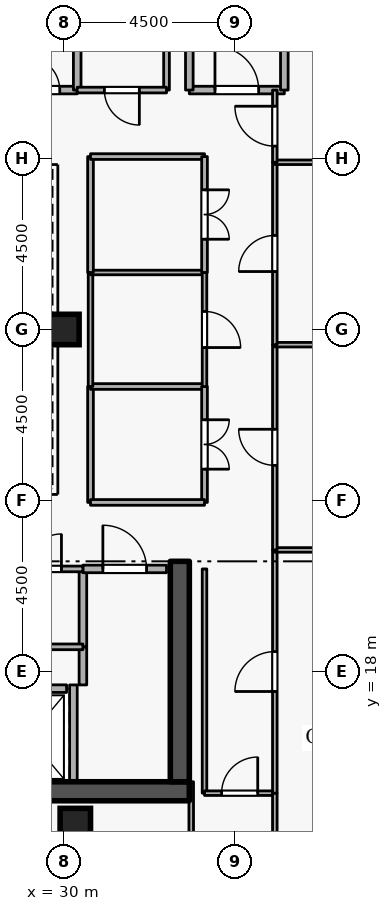
"""IFC4 building model, lengths in metres.
Left out: names, types, materials, properties, quantities, classifications, styles, units other than length and angle.
Written with IfcOpenShell. Run it as: python <this file> out.ifc"""

import sys

from ifc_helpers import new_model, si_unit, direction, frame, frame_2d, origin, origin_2d, place, context, subcontext, project, spatial, rectangle, extrude, element, fill, save


model = new_model("IFC4")
c1 = context("Model", 3, precision=1e-05, world=origin(), true_north=direction((0.0, 1.0)))
c2 = subcontext(c1, "Body", "Model", "MODEL_VIEW")
j1 = project(units=[si_unit("LENGTHUNIT", "METRE"), si_unit("PLANEANGLEUNIT", "RADIAN")], contexts=[c1])
p1 = place(None, origin())
s1 = spatial("IfcSite", under=j1, at=p1, CompositionType="ELEMENT")
p2 = place(p1, origin())
s2 = spatial("IfcBuilding", under=s1, at=p2, CompositionType="ELEMENT")
p3 = place(p2, frame((0.0, 0.0, 276.3)))
s3 = spatial("IfcBuildingStorey", under=s2, at=p3, CompositionType="ELEMENT", Elevation=276.3)
p4 = place(p3, frame((17.7, 14.85, 0.0), z_axis=(0.0, 0.0, 1.0), x_axis=(1.0, 0.0, 0.0)))
e1 = element("IfcWall", 1, at=p4, inside=s3, PredefinedType="SHEAR", context=c2, shape_type="SweptSolid", body=[
    extrude(rectangle(XDim=15.6, YDim=0.5, at=frame_2d((7.8, 0.0))), origin(), (0.0, 0.0, 1.0), 3.6),
])
p5 = place(p3, frame((33.05, 15.1, 0.0), z_axis=(0.0, 0.0, 1.0), x_axis=(0.0, 1.0, 0.0)))
e2 = element("IfcWall", 2, at=p5, inside=s3, PredefinedType="SHEAR", context=c2, shape_type="SweptSolid", body=[
    extrude(rectangle(XDim=5.8, YDim=0.5, at=frame_2d((2.9, 0.0))), origin(), (0.0, 0.0, 1.0), 3.6),
])
for number, where, z_axis, x_axis in (
    (3, (30.3, 14.0, 0.0), (0.0, 0.0, 1.0), (1.0, 0.0, 0.0)),
    (4, (30.0, 27.0, 0.0), (0.0, 0.0, 1.0), (1.0, 0.0, 0.0)),
):
    element("IfcColumn", number, at=place(p3, frame(where, z_axis=z_axis, x_axis=x_axis)), inside=s3, PredefinedType="COLUMN", context=c2, shape_type="SweptSolid", body=[
        extrude(rectangle(XDim=0.8, YDim=0.8, at=origin_2d()), origin(), (0.0, 0.0, 1.0), 3.6),
    ])
p6 = place(p3, frame((28.08, 17.55, 0.0), z_axis=(0.0, 0.0, 1.0), x_axis=(1.0, 0.0, 0.0)))
e5 = element("IfcWall", 5, at=p6, inside=s3, PredefinedType="STANDARD", context=c2, shape_type="SweptSolid", body=[
    extrude(rectangle(XDim=1.99, YDim=0.2, at=frame_2d((0.995, 0.0))), origin(), (0.0, 0.0, 1.0), 3.26),
])
p7 = place(p6, frame((0.485, 0.0, 0.0)))
e6 = element("IfcOpeningElement", 6, at=p7, cuts=e5, PredefinedType="OPENING", context=c2, shape_type="SweptSolid", body=[
    extrude(rectangle(XDim=1.02, YDim=2.06, at=frame_2d((0.51, 1.03))), frame((0.0, 0.11, 0.0), z_axis=(0.0, -1.0, 0.0), x_axis=(1.0, 0.0, 0.0)), (0.0, 0.0, 1.0), 0.22),
])
p8 = place(p3, frame((30.25, 15.112, 0.0), z_axis=(0.0, 0.0, 1.0), x_axis=(0.0, 1.0, 0.0)))
e7 = element("IfcWall", 7, at=p8, inside=s3, PredefinedType="STANDARD", context=c2, shape_type="SweptSolid", body=[
    extrude(rectangle(XDim=2.536, YDim=0.2, at=frame_2d((1.268, 0.0))), origin(), (0.0, 0.0, 1.0), 3.26),
])
p9 = place(p3, frame((33.3, 33.3, 0.0), z_axis=(0.0, 0.0, 1.0), x_axis=(1.0, 0.0, 0.0)))
e8 = element("IfcWall", 8, at=p9, inside=s3, PredefinedType="STANDARD", context=c2, shape_type="SweptSolid", body=[
    extrude(rectangle(XDim=2.5, YDim=0.2, at=frame_2d((1.25, 0.0))), origin(), (0.0, 0.0, 1.0), 3.26),
])
p10 = place(p9, frame((0.675, 0.0, 0.0)))
e9 = element("IfcOpeningElement", 9, at=p10, cuts=e8, PredefinedType="OPENING", context=c2, shape_type="SweptSolid", body=[
    extrude(rectangle(XDim=1.15, YDim=2.1, at=frame_2d((0.575, 1.05))), frame((0.0, 0.11, 0.0), z_axis=(0.0, -1.0, 0.0), x_axis=(1.0, 0.0, 0.0)), (0.0, 0.0, 1.0), 0.22),
])
p11 = place(p3, frame((35.8, 33.3, 0.0), z_axis=(0.0, 0.0, 1.0), x_axis=(0.0, 1.0, 0.0)))
e10 = element("IfcWall", 10, at=p11, inside=s3, PredefinedType="STANDARD", context=c2, shape_type="SweptSolid", body=[
    extrude(rectangle(XDim=5.7, YDim=0.2, at=frame_2d((2.85, 0.0))), origin(), (0.0, 0.0, 1.0), 3.26),
])
p12 = place(p3, frame((33.3, 35.6, 0.0), z_axis=(0.0, 0.0, 1.0), x_axis=(0.0, -1.0, 0.0)))
e11 = element("IfcWall", 11, at=p12, inside=s3, PredefinedType="STANDARD", context=c2, shape_type="SweptSolid", body=[
    extrude(rectangle(XDim=2.3, YDim=0.2, at=frame_2d((1.15, 0.0))), origin(), (0.0, 0.0, 1.0), 2.465),
])
p13 = place(p3, frame((28.55, 33.3, 0.0), z_axis=(0.0, 0.0, 1.0), x_axis=(1.0, 0.0, 0.0)))
e12 = element("IfcWall", 12, at=p13, inside=s3, PredefinedType="STANDARD", context=c2, shape_type="SweptSolid", body=[
    extrude(rectangle(XDim=1.8, YDim=0.2, at=frame_2d((0.9, 0.0))), origin(), (0.0, 0.0, 1.0), 3.26),
])
p14 = place(p13, frame((0.46, 0.0, 0.0)))
e13 = element("IfcOpeningElement", 13, at=p14, cuts=e12, PredefinedType="OPENING", context=c2, shape_type="SweptSolid", body=[
    extrude(rectangle(XDim=0.88, YDim=2.04, at=frame_2d((0.44, 1.02))), frame((0.0, 0.11, 0.0), z_axis=(0.0, -1.0, 0.0), x_axis=(1.0, 0.0, 0.0)), (0.0, 0.0, 1.0), 0.22),
])
p15 = place(p3, frame((30.35, 33.3, 0.0), z_axis=(0.0, 0.0, 1.0), x_axis=(0.0, 1.0, 0.0)))
e14 = element("IfcWall", 14, at=p15, inside=s3, PredefinedType="STANDARD", context=c2, shape_type="SweptSolid", body=[
    extrude(rectangle(XDim=2.05, YDim=0.2, at=frame_2d((1.025, 0.0))), origin(), (0.0, 0.0, 1.0), 3.26),
])
p16 = place(p3, frame((30.5, 17.648, 0.0), z_axis=(0.0, 0.0, 1.0), x_axis=(0.0, 1.0, 0.0)))
e15 = element("IfcWall", 15, at=p16, inside=s3, PredefinedType="STANDARD", context=c2, shape_type="SweptSolid", body=[
    extrude(rectangle(XDim=1.002, YDim=0.2, at=frame_2d((0.501, 0.0))), origin(), (0.0, 0.0, 1.0), 3.26),
])
p17 = place(p3, frame((30.5, 18.65, 0.0), z_axis=(0.0, 0.0, 1.0), x_axis=(0.0, 1.0, 0.0)))
e16 = element("IfcWall", 16, at=p17, inside=s3, PredefinedType="STANDARD", context=c2, shape_type="SweptSolid", body=[
    extrude(rectangle(XDim=2.05, YDim=0.2, at=frame_2d((1.025, 0.0))), origin(), (0.0, 0.0, 1.0), 3.26),
])
p18 = place(p3, frame((30.5, 20.7, 0.0), z_axis=(0.0, 0.0, 1.0), x_axis=(1.0, 0.0, 0.0)))
e17 = element("IfcWall", 17, at=p18, inside=s3, PredefinedType="STANDARD", context=c2, shape_type="SweptSolid", body=[
    extrude(rectangle(XDim=2.2, YDim=0.2, at=frame_2d((1.1, 0.0))), origin(), (0.0, 0.0, 1.0), 3.26),
])
p19 = place(p18, frame((0.525, 0.0, 0.0)))
e18 = element("IfcOpeningElement", 18, at=p19, cuts=e17, PredefinedType="OPENING", context=c2, shape_type="SweptSolid", body=[
    extrude(rectangle(XDim=1.15, YDim=2.1, at=frame_2d((0.575, 1.05))), frame((0.0, 0.11, 0.0), z_axis=(0.0, -1.0, 0.0), x_axis=(1.0, 0.0, 0.0)), (0.0, 0.0, 1.0), 0.22),
])
p20 = place(p3, frame((30.5, 18.65, 0.0), z_axis=(0.0, 0.0, 1.0), x_axis=(-1.0, 0.0, 0.0)))
e19 = element("IfcWall", 19, at=p20, inside=s3, PredefinedType="PARTITIONING", context=c2, shape_type="SweptSolid", body=[
    extrude(rectangle(XDim=2.05, YDim=0.15, at=frame_2d((1.025, 0.0))), origin(), (0.0, 0.0, 1.0), 3.26),
])
p21 = place(p3, frame((28.45, 20.7, 0.0), z_axis=(0.0, 0.0, 1.0), x_axis=(1.0, 0.0, 0.0)))
e20 = element("IfcWall", 20, at=p21, inside=s3, PredefinedType="PARTITIONING", context=c2, shape_type="SweptSolid", body=[
    extrude(rectangle(XDim=2.05, YDim=0.15, at=frame_2d((1.025, 0.0))), origin(), (0.0, 0.0, 1.0), 3.26),
])
p22 = place(p21, frame((0.565, 0.0, 0.0)))
e21 = element("IfcOpeningElement", 21, at=p22, cuts=e20, PredefinedType="OPENING", context=c2, shape_type="SweptSolid", body=[
    extrude(rectangle(XDim=0.92, YDim=2.08, at=frame_2d((0.46, 1.04))), frame((0.0, 0.085, 0.0), z_axis=(0.0, -1.0, 0.0), x_axis=(1.0, 0.0, 0.0)), (0.0, 0.0, 1.0), 0.17),
])
p23 = place(p3, frame((32.7, 35.35, 0.0), z_axis=(0.0, 0.0, 1.0), x_axis=(0.0, -1.0, 0.0)))
e22 = element("IfcWall", 22, at=p23, inside=s3, PredefinedType="PARTITIONING", context=c2, shape_type="SweptSolid", body=[
    extrude(rectangle(XDim=2.05, YDim=0.15, at=frame_2d((1.025, 0.0))), origin(), (0.0, 0.0, 1.0), 2.465),
])
p24 = place(p3, frame((32.7, 33.3, 0.0), z_axis=(0.0, 0.0, 1.0), x_axis=(-1.0, 0.0, 0.0)))
e23 = element("IfcWall", 23, at=p24, inside=s3, PredefinedType="PARTITIONING", context=c2, shape_type="SweptSolid", body=[
    extrude(rectangle(XDim=2.35, YDim=0.15, at=frame_2d((1.175, 0.0))), origin(), (0.0, 0.0, 1.0), 3.26),
])
p25 = place(p24, frame((0.715, 0.0, 0.0)))
e24 = element("IfcOpeningElement", 24, at=p25, cuts=e23, PredefinedType="OPENING", context=c2, shape_type="SweptSolid", body=[
    extrude(rectangle(XDim=0.92, YDim=2.08, at=frame_2d((0.46, 1.04))), frame((0.0, 0.085, 0.0), z_axis=(0.0, -1.0, 0.0), x_axis=(1.0, 0.0, 0.0)), (0.0, 0.0, 1.0), 0.17),
])
p26 = place(p3, frame((33.7, 20.7, 0.0), z_axis=(0.0, 0.0, 1.0), x_axis=(0.0, -1.0, 0.0)))
e25 = element("IfcWall", 25, at=p26, inside=s3, PredefinedType="PARTITIONING", context=c2, shape_type="SweptSolid", body=[
    extrude(rectangle(XDim=5.9, YDim=0.12, at=frame_2d((2.95, 0.0))), origin(), (0.0, 0.0, 1.0), 3.26),
])
p27 = place(p3, frame((33.7, 14.8, 0.0), z_axis=(0.0, 0.0, 1.0), x_axis=(1.0, 0.0, 0.0)))
e26 = element("IfcWall", 26, at=p27, inside=s3, PredefinedType="PARTITIONING", context=c2, shape_type="SweptSolid", body=[
    extrude(rectangle(XDim=1.85, YDim=0.12, at=frame_2d((0.925, 0.0))), origin(), (0.0, 0.0, 1.0), 3.26),
])
p28 = place(p27, frame((0.45, 0.0, 0.0)))
e27 = element("IfcOpeningElement", 27, at=p28, cuts=e26, PredefinedType="OPENING", context=c2, shape_type="SweptSolid", body=[
    extrude(rectangle(XDim=0.95, YDim=2.1, at=frame_2d((0.475, 1.05))), frame((0.0, 0.07, 0.0), z_axis=(0.0, -1.0, 0.0), x_axis=(1.0, 0.0, 0.0)), (0.0, 0.0, 1.0), 0.14),
])
p29 = place(p3, frame((35.55, 14.8, 0.0), z_axis=(0.0, 0.0, 1.0), x_axis=(0.0, -1.0, 0.0)))
e28 = element("IfcWall", 28, at=p29, inside=s3, PredefinedType="PARTITIONING", context=c2, shape_type="SweptSolid", body=[
    extrude(rectangle(XDim=11.52, YDim=0.12, at=frame_2d((5.76, 0.0))), origin(), (0.0, 0.0, 1.0), 3.26),
])
p30 = place(p3, frame((33.35, 3.28, 0.0), z_axis=(0.0, 0.0, 1.0), x_axis=(0.0, 1.0, 0.0)))
e29 = element("IfcWall", 29, at=p30, inside=s3, PredefinedType="PARTITIONING", context=c2, shape_type="SweptSolid", body=[
    extrude(rectangle(XDim=11.82, YDim=0.12, at=frame_2d((5.91, 0.0))), origin(), (0.0, 0.0, 1.0), 2.465),
])
p31 = place(p3, frame((35.55, 14.8, 0.0), z_axis=(0.0, 0.0, 1.0), x_axis=(0.0, 1.0, 0.0)))
e30 = element("IfcWall", 30, at=p31, inside=s3, PredefinedType="PARTITIONING", context=c2, shape_type="SweptSolid", body=[
    extrude(rectangle(XDim=6.4, YDim=0.12, at=frame_2d((3.2, 0.0))), origin(), (0.0, 0.0, 1.0), 3.26),
])
p32 = place(p31, frame((2.675, 0.0, 0.0)))
e31 = element("IfcOpeningElement", 31, at=p32, cuts=e30, PredefinedType="OPENING", context=c2, shape_type="SweptSolid", body=[
    extrude(rectangle(XDim=1.05, YDim=2.1, at=frame_2d((0.525, 1.05))), frame((0.0, 0.07, 0.0), z_axis=(0.0, -1.0, 0.0), x_axis=(1.0, 0.0, 0.0)), (0.0, 0.0, 1.0), 0.14),
])
p33 = place(p3, frame((35.55, 21.2, 0.0), z_axis=(0.0, 0.0, 1.0), x_axis=(1.0, 0.0, 0.0)))
e32 = element("IfcWall", 32, at=p33, inside=s3, PredefinedType="PARTITIONING", context=c2, shape_type="SweptSolid", body=[
    extrude(rectangle(XDim=13.67, YDim=0.12, at=frame_2d((6.835, 0.0))), origin(), (0.0, 0.0, 1.0), 3.26),
])
p34 = place(p3, frame((35.55, 21.2, 0.0), z_axis=(0.0, 0.0, 1.0), x_axis=(0.0, 1.0, 0.0)))
e33 = element("IfcWall", 33, at=p34, inside=s3, PredefinedType="PARTITIONING", context=c2, shape_type="SweptSolid", body=[
    extrude(rectangle(XDim=5.4, YDim=0.12, at=frame_2d((2.7, 0.0))), origin(), (0.0, 0.0, 1.0), 3.26),
])
p35 = place(p34, frame((2.225, 0.0, 0.0)))
e34 = element("IfcOpeningElement", 34, at=p35, cuts=e33, PredefinedType="OPENING", context=c2, shape_type="SweptSolid", body=[
    extrude(rectangle(XDim=0.95, YDim=2.1, at=frame_2d((0.475, 1.05))), frame((0.0, 0.07, 0.0), z_axis=(0.0, -1.0, 0.0), x_axis=(1.0, 0.0, 0.0)), (0.0, 0.0, 1.0), 0.14),
])
p36 = place(p3, frame((35.55, 26.6, 0.0), z_axis=(0.0, 0.0, 1.0), x_axis=(1.0, 0.0, 0.0)))
e35 = element("IfcWall", 35, at=p36, inside=s3, PredefinedType="PARTITIONING", context=c2, shape_type="SweptSolid", body=[
    extrude(rectangle(XDim=13.67, YDim=0.12, at=frame_2d((6.835, 0.0))), origin(), (0.0, 0.0, 1.0), 3.26),
])
p37 = place(p3, frame((35.55, 26.6, 0.0), z_axis=(0.0, 0.0, 1.0), x_axis=(0.0, 1.0, 0.0)))
e36 = element("IfcWall", 36, at=p37, inside=s3, PredefinedType="PARTITIONING", context=c2, shape_type="SweptSolid", body=[
    extrude(rectangle(XDim=4.8, YDim=0.12, at=frame_2d((2.4, 0.0))), origin(), (0.0, 0.0, 1.0), 3.26),
])
p38 = place(p37, frame((1.925, 0.0, 0.0)))
e37 = element("IfcOpeningElement", 37, at=p38, cuts=e36, PredefinedType="OPENING", context=c2, shape_type="SweptSolid", body=[
    extrude(rectangle(XDim=0.95, YDim=2.1, at=frame_2d((0.475, 1.05))), frame((0.0, 0.07, 0.0), z_axis=(0.0, -1.0, 0.0), x_axis=(1.0, 0.0, 0.0)), (0.0, 0.0, 1.0), 0.14),
])
p39 = place(p3, frame((35.55, 31.4, 0.0), z_axis=(0.0, 0.0, 1.0), x_axis=(1.0, 0.0, 0.0)))
e38 = element("IfcWall", 38, at=p39, inside=s3, PredefinedType="PARTITIONING", context=c2, shape_type="SweptSolid", body=[
    extrude(rectangle(XDim=13.67, YDim=0.12, at=frame_2d((6.835, 0.0))), origin(), (0.0, 0.0, 1.0), 3.26),
])
p40 = place(p3, frame((35.55, 31.4, 0.0), z_axis=(0.0, 0.0, 1.0), x_axis=(0.0, 1.0, 0.0)))
e39 = element("IfcWall", 39, at=p40, inside=s3, PredefinedType="PARTITIONING", context=c2, shape_type="SweptSolid", body=[
    extrude(rectangle(XDim=1.9, YDim=0.12, at=frame_2d((0.95, 0.0))), origin(), (0.0, 0.0, 1.0), 3.26),
])
p41 = place(p40, frame((0.425, 0.0, 0.0)))
e40 = element("IfcOpeningElement", 40, at=p41, cuts=e39, PredefinedType="OPENING", context=c2, shape_type="SweptSolid", body=[
    extrude(rectangle(XDim=1.05, YDim=2.1, at=frame_2d((0.525, 1.05))), frame((0.0, 0.07, 0.0), z_axis=(0.0, -1.0, 0.0), x_axis=(1.0, 0.0, 0.0)), (0.0, 0.0, 1.0), 0.14),
])
p42 = place(p3, frame((30.7, 22.45, 0.0), z_axis=(0.0, 0.0, 1.0), x_axis=(0.0, 1.0, 0.0)))
e41 = element("IfcWall", 41, at=p42, inside=s3, PredefinedType="PARTITIONING", context=c2, shape_type="SweptSolid", body=[
    extrude(rectangle(XDim=3.05, YDim=0.15, at=frame_2d((1.525, 0.0))), origin(), (0.0, 0.0, 1.0), 3.26),
])
p43 = place(p3, frame((30.7, 25.5, 0.0), z_axis=(0.0, 0.0, 1.0), x_axis=(1.0, 0.0, 0.0)))
e42 = element("IfcWall", 42, at=p43, inside=s3, PredefinedType="PARTITIONING", context=c2, shape_type="SweptSolid", body=[
    extrude(rectangle(XDim=3.0, YDim=0.15, at=frame_2d((1.5, 0.0))), origin(), (0.0, 0.0, 1.0), 3.26),
])
p44 = place(p3, frame((33.7, 25.5, 0.0), z_axis=(0.0, 0.0, 1.0), x_axis=(0.0, -1.0, 0.0)))
e43 = element("IfcWall", 43, at=p44, inside=s3, PredefinedType="PARTITIONING", context=c2, shape_type="SweptSolid", body=[
    extrude(rectangle(XDim=3.05, YDim=0.15, at=frame_2d((1.525, 0.0))), origin(), (0.0, 0.0, 1.0), 3.26),
])
p45 = place(p44, frame((0.875, 0.0, 0.0)))
e44 = element("IfcOpeningElement", 44, at=p45, cuts=e43, PredefinedType="OPENING", context=c2, shape_type="SweptSolid", body=[
    extrude(rectangle(XDim=1.3, YDim=2.12, at=frame_2d((0.65, 1.06))), frame((0.0, 0.085, 0.0), z_axis=(0.0, -1.0, 0.0), x_axis=(1.0, 0.0, 0.0)), (0.0, 0.0, 1.0), 0.17),
])
p46 = place(p3, frame((33.7, 22.45, 0.0), z_axis=(0.0, 0.0, 1.0), x_axis=(-1.0, 0.0, 0.0)))
e45 = element("IfcWall", 45, at=p46, inside=s3, PredefinedType="PARTITIONING", context=c2, shape_type="SweptSolid", body=[
    extrude(rectangle(XDim=3.0, YDim=0.15, at=frame_2d((1.5, 0.0))), origin(), (0.0, 0.0, 1.0), 3.26),
])
for number, where, z_axis, x_axis in (
    (46, (30.7, 25.5, 0.0), (0.0, 0.0, 1.0), (0.0, 1.0, 0.0)),
    (47, (30.7, 28.5, 0.0), (0.0, 0.0, 1.0), (1.0, 0.0, 0.0)),
):
    element("IfcWall", number, at=place(p3, frame(where, z_axis=z_axis, x_axis=x_axis)), inside=s3, PredefinedType="PARTITIONING", context=c2, shape_type="SweptSolid", body=[
        extrude(rectangle(XDim=3.0, YDim=0.12, at=frame_2d((1.5, 0.0))), origin(), (0.0, 0.0, 1.0), 3.26),
    ])
p47 = place(p3, frame((33.7, 28.5, 0.0), z_axis=(0.0, 0.0, 1.0), x_axis=(0.0, -1.0, 0.0)))
e48 = element("IfcWall", 48, at=p47, inside=s3, PredefinedType="PARTITIONING", context=c2, shape_type="SweptSolid", body=[
    extrude(rectangle(XDim=3.0, YDim=0.12, at=frame_2d((1.5, 0.0))), origin(), (0.0, 0.0, 1.0), 3.26),
])
p48 = place(p47, frame((1.025, 0.0, 0.0)))
e49 = element("IfcOpeningElement", 49, at=p48, cuts=e48, PredefinedType="OPENING", context=c2, shape_type="SweptSolid", body=[
    extrude(rectangle(XDim=0.95, YDim=2.1, at=frame_2d((0.475, 1.05))), frame((0.0, 0.07, 0.0), z_axis=(0.0, -1.0, 0.0), x_axis=(1.0, 0.0, 0.0)), (0.0, 0.0, 1.0), 0.14),
])
p49 = place(p3, frame((30.7, 28.5, 0.0), z_axis=(0.0, 0.0, 1.0), x_axis=(0.0, 1.0, 0.0)))
e50 = element("IfcWall", 50, at=p49, inside=s3, PredefinedType="PARTITIONING", context=c2, shape_type="SweptSolid", body=[
    extrude(rectangle(XDim=3.05, YDim=0.15, at=frame_2d((1.525, 0.0))), origin(), (0.0, 0.0, 1.0), 3.26),
])
p50 = place(p3, frame((30.7, 31.55, 0.0), z_axis=(0.0, 0.0, 1.0), x_axis=(1.0, 0.0, 0.0)))
e51 = element("IfcWall", 51, at=p50, inside=s3, PredefinedType="PARTITIONING", context=c2, shape_type="SweptSolid", body=[
    extrude(rectangle(XDim=3.0, YDim=0.15, at=frame_2d((1.5, 0.0))), origin(), (0.0, 0.0, 1.0), 3.26),
])
p51 = place(p3, frame((33.7, 31.55, 0.0), z_axis=(0.0, 0.0, 1.0), x_axis=(0.0, -1.0, 0.0)))
e52 = element("IfcWall", 52, at=p51, inside=s3, PredefinedType="PARTITIONING", context=c2, shape_type="SweptSolid", body=[
    extrude(rectangle(XDim=3.05, YDim=0.15, at=frame_2d((1.525, 0.0))), origin(), (0.0, 0.0, 1.0), 3.26),
])
p52 = place(p51, frame((0.875, 0.0, 0.0)))
e53 = element("IfcOpeningElement", 53, at=p52, cuts=e52, PredefinedType="OPENING", context=c2, shape_type="SweptSolid", body=[
    extrude(rectangle(XDim=1.3, YDim=2.12, at=frame_2d((0.65, 1.06))), frame((0.0, 0.085, 0.0), z_axis=(0.0, -1.0, 0.0), x_axis=(1.0, 0.0, 0.0)), (0.0, 0.0, 1.0), 0.17),
])
p53 = place(p10, origin())
e54 = element("IfcDoor", 54, at=p53, inside=s3, OperationType="SINGLE_SWING_LEFT", PredefinedType="DOOR", context=c2, shape_type="SweptSolid", body=[
    extrude(rectangle(XDim=1.15, YDim=2.1, at=frame_2d((0.575, 1.05))), frame((0.0, 0.025, 0.0), z_axis=(0.0, -1.0, 0.0), x_axis=(1.0, 0.0, 0.0)), (0.0, 0.0, 1.0), 0.05),
])
fill(e9, e54)
p54 = place(p14, origin())
e55 = element("IfcDoor", 55, at=p54, inside=s3, OperationType="SINGLE_SWING_LEFT", PredefinedType="DOOR", context=c2, shape_type="SweptSolid", body=[
    extrude(rectangle(XDim=0.88, YDim=2.04, at=frame_2d((0.44, 1.02))), frame((0.0, 0.025, 0.0), z_axis=(0.0, -1.0, 0.0), x_axis=(1.0, 0.0, 0.0)), (0.0, 0.0, 1.0), 0.05),
])
fill(e13, e55)
p55 = place(p22, origin())
e56 = element("IfcDoor", 56, at=p55, inside=s3, OperationType="SINGLE_SWING_RIGHT", PredefinedType="DOOR", context=c2, shape_type="SweptSolid", body=[
    extrude(rectangle(XDim=0.92, YDim=2.08, at=frame_2d((0.46, 1.04))), frame((0.0, 0.025, 0.0), z_axis=(0.0, -1.0, 0.0), x_axis=(1.0, 0.0, 0.0)), (0.0, 0.0, 1.0), 0.05),
])
fill(e21, e56)
p56 = place(p19, origin())
e57 = element("IfcDoor", 57, at=p56, inside=s3, OperationType="SINGLE_SWING_LEFT", PredefinedType="DOOR", context=c2, shape_type="SweptSolid", body=[
    extrude(rectangle(XDim=1.15, YDim=2.1, at=frame_2d((0.575, 1.05))), frame((0.0, 0.025, 0.0), z_axis=(0.0, -1.0, 0.0), x_axis=(1.0, 0.0, 0.0)), (0.0, 0.0, 1.0), 0.05),
])
fill(e18, e57)
p57 = place(p25, origin())
e58 = element("IfcDoor", 58, at=p57, inside=s3, OperationType="SINGLE_SWING_LEFT", PredefinedType="DOOR", context=c2, shape_type="SweptSolid", body=[
    extrude(rectangle(XDim=0.92, YDim=2.08, at=frame_2d((0.46, 1.04))), frame((0.0, 0.025, 0.0), z_axis=(0.0, -1.0, 0.0), x_axis=(1.0, 0.0, 0.0)), (0.0, 0.0, 1.0), 0.05),
])
fill(e24, e58)
p58 = place(p28, origin())
e59 = element("IfcDoor", 59, at=p58, inside=s3, OperationType="SINGLE_SWING_RIGHT", PredefinedType="DOOR", context=c2, shape_type="SweptSolid", body=[
    extrude(rectangle(XDim=0.95, YDim=2.1, at=frame_2d((0.475, 1.05))), frame((0.0, 0.025, 0.0), z_axis=(0.0, -1.0, 0.0), x_axis=(1.0, 0.0, 0.0)), (0.0, 0.0, 1.0), 0.05),
])
fill(e27, e59)
p59 = place(p32, origin())
e60 = element("IfcDoor", 60, at=p59, inside=s3, OperationType="SINGLE_SWING_LEFT", PredefinedType="DOOR", context=c2, shape_type="SweptSolid", body=[
    extrude(rectangle(XDim=1.05, YDim=2.1, at=frame_2d((0.525, 1.05))), frame((0.0, 0.025, 0.0), z_axis=(0.0, -1.0, 0.0), x_axis=(1.0, 0.0, 0.0)), (0.0, 0.0, 1.0), 0.05),
])
fill(e31, e60)
p60 = place(p35, origin())
e61 = element("IfcDoor", 61, at=p60, inside=s3, OperationType="SINGLE_SWING_RIGHT", PredefinedType="DOOR", context=c2, shape_type="SweptSolid", body=[
    extrude(rectangle(XDim=0.95, YDim=2.1, at=frame_2d((0.475, 1.05))), frame((0.0, 0.025, 0.0), z_axis=(0.0, -1.0, 0.0), x_axis=(1.0, 0.0, 0.0)), (0.0, 0.0, 1.0), 0.05),
])
fill(e34, e61)
p61 = place(p38, origin())
e62 = element("IfcDoor", 62, at=p61, inside=s3, OperationType="SINGLE_SWING_LEFT", PredefinedType="DOOR", context=c2, shape_type="SweptSolid", body=[
    extrude(rectangle(XDim=0.95, YDim=2.1, at=frame_2d((0.475, 1.05))), frame((0.0, 0.025, 0.0), z_axis=(0.0, -1.0, 0.0), x_axis=(1.0, 0.0, 0.0)), (0.0, 0.0, 1.0), 0.05),
])
fill(e37, e62)
p62 = place(p41, origin())
e63 = element("IfcDoor", 63, at=p62, inside=s3, OperationType="SINGLE_SWING_RIGHT", PredefinedType="DOOR", context=c2, shape_type="SweptSolid", body=[
    extrude(rectangle(XDim=1.05, YDim=2.1, at=frame_2d((0.525, 1.05))), frame((0.0, 0.025, 0.0), z_axis=(0.0, -1.0, 0.0), x_axis=(1.0, 0.0, 0.0)), (0.0, 0.0, 1.0), 0.05),
])
fill(e40, e63)
p63 = place(p45, origin())
e64 = element("IfcDoor", 64, at=p63, inside=s3, OperationType="DOUBLE_DOOR_SINGLE_SWING", PredefinedType="DOOR", context=c2, shape_type="SweptSolid", body=[
    extrude(rectangle(XDim=1.3, YDim=2.12, at=frame_2d((0.65, 1.06))), frame((0.0, 0.025, 0.0), z_axis=(0.0, -1.0, 0.0), x_axis=(1.0, 0.0, 0.0)), (0.0, 0.0, 1.0), 0.05),
])
fill(e44, e64)
p64 = place(p48, origin())
e65 = element("IfcDoor", 65, at=p64, inside=s3, OperationType="SINGLE_SWING_RIGHT", PredefinedType="DOOR", context=c2, shape_type="SweptSolid", body=[
    extrude(rectangle(XDim=0.95, YDim=2.1, at=frame_2d((0.475, 1.05))), frame((0.0, 0.025, 0.0), z_axis=(0.0, -1.0, 0.0), x_axis=(1.0, 0.0, 0.0)), (0.0, 0.0, 1.0), 0.05),
])
fill(e49, e65)
p65 = place(p52, origin())
e66 = element("IfcDoor", 66, at=p65, inside=s3, OperationType="DOUBLE_DOOR_SINGLE_SWING", PredefinedType="DOOR", context=c2, shape_type="SweptSolid", body=[
    extrude(rectangle(XDim=1.3, YDim=2.12, at=frame_2d((0.65, 1.06))), frame((0.0, 0.025, 0.0), z_axis=(0.0, -1.0, 0.0), x_axis=(1.0, 0.0, 0.0)), (0.0, 0.0, 1.0), 0.05),
])
fill(e53, e66)
save(model, sys.argv[1])
